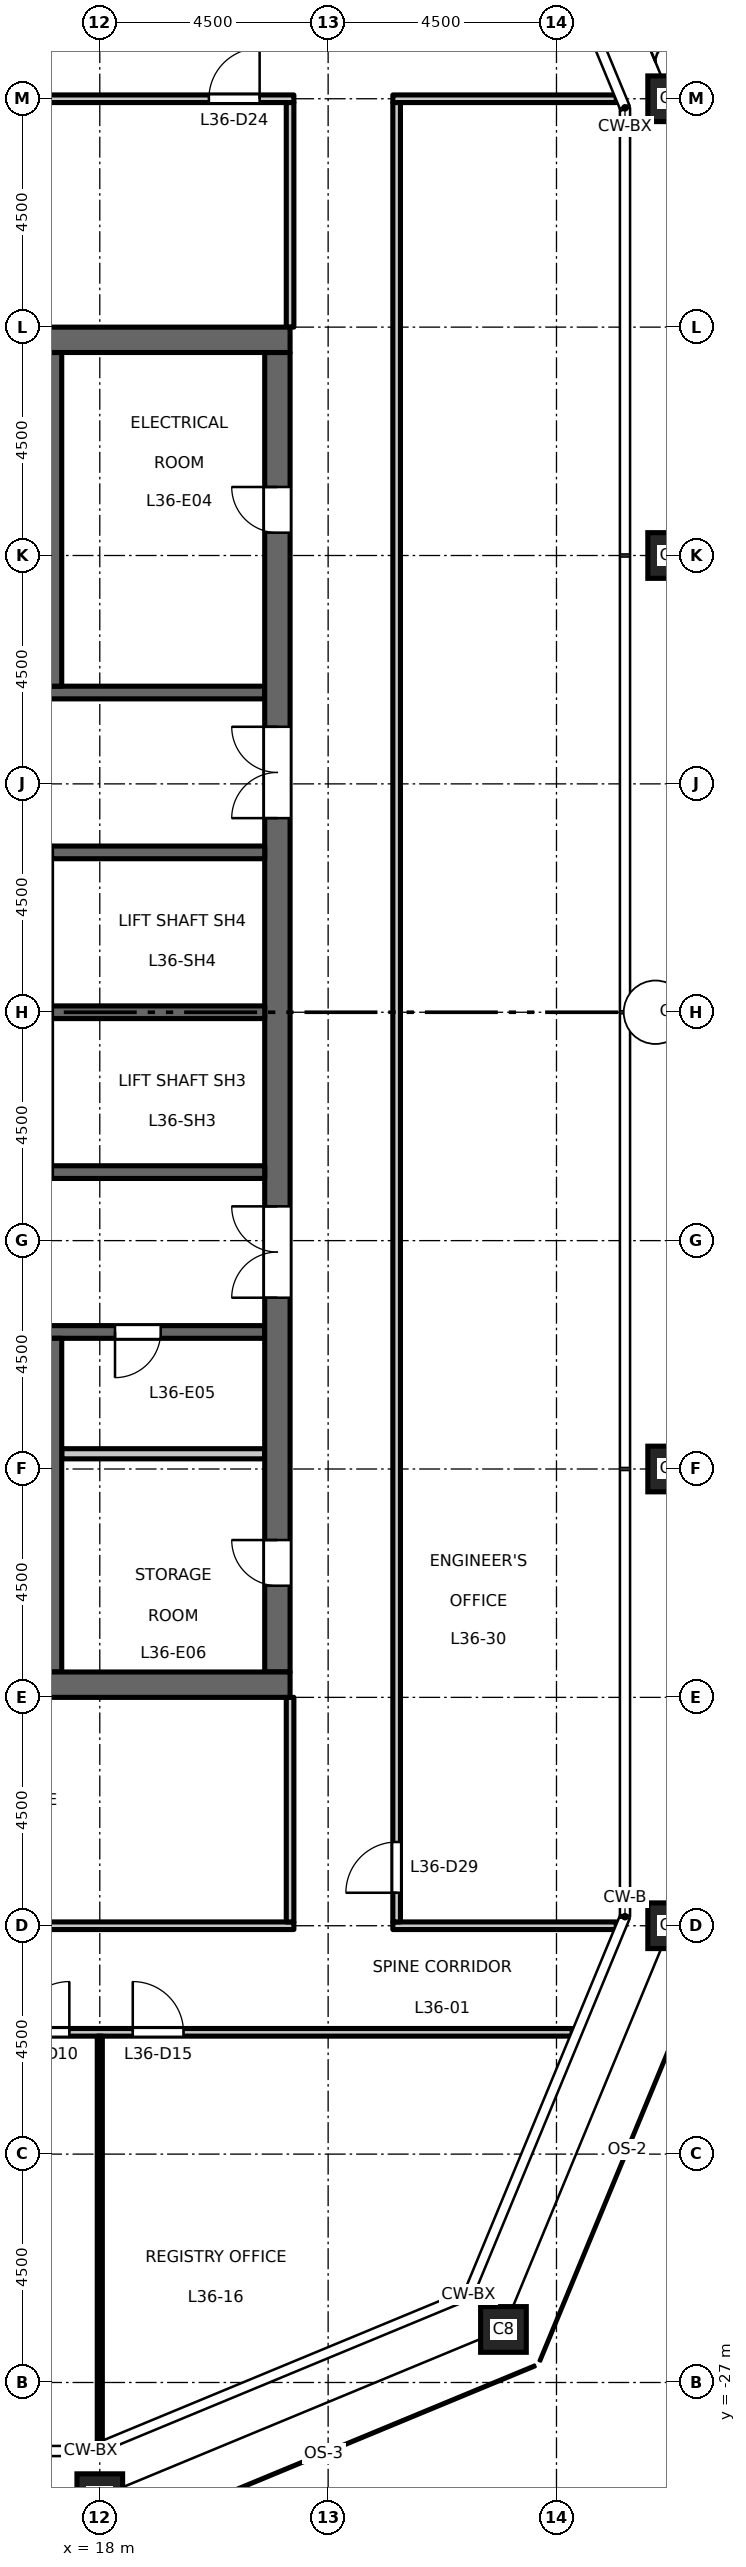
"""IFC4 building model, lengths in metres.
Left out: names, types, materials, properties, quantities, classifications, styles, units other than length and angle.
Written with IfcOpenShell. Run it as: python <this file> out.ifc"""

import sys

from ifc_helpers import new_model, si_unit, direction, frame, frame_2d, origin, origin_2d, place, context, subcontext, project, spatial, rectangle, hollow_rectangle, extrude, element, fill, save


model = new_model("IFC4")
c1 = context("Model", 3, precision=1e-05, world=origin(), true_north=direction((0.0, 1.0)))
c2 = subcontext(c1, "Body", "Model", "MODEL_VIEW")
j1 = project(units=[si_unit("LENGTHUNIT", "METRE"), si_unit("PLANEANGLEUNIT", "RADIAN")], contexts=[c1])
p1 = place(None, origin())
s1 = spatial("IfcSite", under=j1, at=p1, CompositionType="ELEMENT")
p2 = place(p1, origin())
s2 = spatial("IfcBuilding", under=s1, at=p2, CompositionType="ELEMENT")
p3 = place(p2, frame((0.0, 0.0, 167.7)))
s3 = spatial("IfcBuildingStorey", under=s2, at=p3, CompositionType="ELEMENT", Elevation=167.7)
for number, where, z_axis, x_axis in (
    (1, (18.0, -29.25, 0.0), (0.0, 0.0, 1.0), (1.0, 0.0, 0.0)),
    (2, (25.955, -25.955, 0.0), (0.0, 0.0, 1.0), (1.0, 0.0, 0.0)),
    (3, (29.25, -18.0, 0.0), (0.0, 0.0, 1.0), (1.0, 0.0, 0.0)),
    (4, (29.25, -9.0, 0.0), (0.0, 0.0, 1.0), (1.0, 0.0, 0.0)),
    (5, (29.25, 0.0, 0.0), (0.0, 0.0, 1.0), (1.0, 0.0, 0.0)),
    (6, (29.25, 9.0, 0.0), (0.0, 0.0, 1.0), (1.0, 0.0, 0.0)),
    (7, (29.25, 18.0, 0.0), (0.0, 0.0, 1.0), (1.0, 0.0, 0.0)),
):
    element("IfcColumn", number, at=place(p3, frame(where, z_axis=z_axis, x_axis=x_axis)), inside=s3, PredefinedType="COLUMN", context=c2, shape_type="SweptSolid", body=[
        extrude(hollow_rectangle(XDim=0.9, YDim=0.9, WallThickness=0.05, at=origin_2d()), origin(), (0.0, 0.0, 1.0), 4.5),
    ])
p4 = place(p3, frame((17.0, 6.3, 0.0), z_axis=(0.0, 0.0, 1.0), x_axis=(1.0, 0.0, 0.0)))
e8 = element("IfcWall", 8, at=p4, inside=s3, PredefinedType="SHEAR", context=c2, shape_type="SweptSolid", body=[
    extrude(rectangle(XDim=4.25, YDim=0.25, at=frame_2d((2.125, 0.0))), origin(), (0.0, 0.0, 1.0), 4.35),
])
p5 = place(p3, frame((12.15, -6.3, 0.0), z_axis=(0.0, 0.0, 1.0), x_axis=(1.0, 0.0, 0.0)))
e9 = element("IfcWall", 9, at=p5, inside=s3, PredefinedType="SHEAR", context=c2, shape_type="SweptSolid", body=[
    extrude(rectangle(XDim=9.1, YDim=0.25, at=frame_2d((4.55, 0.0))), origin(), (0.0, 0.0, 1.0), 4.35),
])
p6 = place(p5, frame((1.8, 0.0, 0.0)))
e10 = element("IfcOpeningElement", 10, at=p6, cuts=e9, PredefinedType="OPENING", context=c2, shape_type="SweptSolid", body=[
    extrude(rectangle(XDim=1.0, YDim=2.1, at=frame_2d((0.5, 1.05))), frame((0.0, 0.135, 0.0), z_axis=(0.0, -1.0, 0.0), x_axis=(1.0, 0.0, 0.0)), (0.0, 0.0, 1.0), 0.27),
])
p7 = place(p5, frame((6.15, 0.0, 0.0)))
e11 = element("IfcOpeningElement", 11, at=p7, cuts=e9, PredefinedType="OPENING", context=c2, shape_type="SweptSolid", body=[
    extrude(rectangle(XDim=0.9, YDim=2.1, at=frame_2d((0.45, 1.05))), frame((0.0, 0.135, 0.0), z_axis=(0.0, -1.0, 0.0), x_axis=(1.0, 0.0, 0.0)), (0.0, 0.0, 1.0), 0.27),
])
p8 = place(p3, frame((21.5, -13.0, 0.0), z_axis=(0.0, 0.0, 1.0), x_axis=(0.0, 1.0, 0.0)))
e12 = element("IfcWall", 12, at=p8, inside=s3, PredefinedType="SHEAR", context=c2, shape_type="SweptSolid", body=[
    extrude(rectangle(XDim=26.0, YDim=0.5, at=frame_2d((13.0, 0.0))), origin(), (0.0, 0.0, 1.0), 4.35),
])
p9 = place(p8, frame((16.825, 0.0, 0.0)))
e13 = element("IfcOpeningElement", 13, at=p9, cuts=e12, PredefinedType="OPENING", context=c2, shape_type="SweptSolid", body=[
    extrude(rectangle(XDim=1.8, YDim=2.1, at=frame_2d((0.9, 1.05))), frame((0.0, 0.26, 0.0), z_axis=(0.0, -1.0, 0.0), x_axis=(1.0, 0.0, 0.0)), (0.0, 0.0, 1.0), 0.52),
])
p10 = place(p8, frame((7.375, 0.0, 0.0)))
e14 = element("IfcOpeningElement", 14, at=p10, cuts=e12, PredefinedType="OPENING", context=c2, shape_type="SweptSolid", body=[
    extrude(rectangle(XDim=1.8, YDim=2.1, at=frame_2d((0.9, 1.05))), frame((0.0, 0.26, 0.0), z_axis=(0.0, -1.0, 0.0), x_axis=(1.0, 0.0, 0.0)), (0.0, 0.0, 1.0), 0.52),
])
p11 = place(p8, frame((22.45, 0.0, 0.0)))
e15 = element("IfcOpeningElement", 15, at=p11, cuts=e12, PredefinedType="OPENING", context=c2, shape_type="SweptSolid", body=[
    extrude(rectangle(XDim=0.9, YDim=2.1, at=frame_2d((0.45, 1.05))), frame((0.0, 0.26, 0.0), z_axis=(0.0, -1.0, 0.0), x_axis=(1.0, 0.0, 0.0)), (0.0, 0.0, 1.0), 0.52),
])
p12 = place(p8, frame((1.7, 0.0, 0.0)))
e16 = element("IfcOpeningElement", 16, at=p12, cuts=e12, PredefinedType="OPENING", context=c2, shape_type="SweptSolid", body=[
    extrude(rectangle(XDim=0.9, YDim=2.1, at=frame_2d((0.45, 1.05))), frame((0.0, 0.26, 0.0), z_axis=(0.0, -1.0, 0.0), x_axis=(1.0, 0.0, 0.0)), (0.0, 0.0, 1.0), 0.52),
])
p13 = place(p3, frame((17.25, -8.7, 0.0), z_axis=(0.0, 0.0, 1.0), x_axis=(1.0, 0.0, 0.0)))
e17 = element("IfcWall", 17, at=p13, inside=s3, PredefinedType="PARTITIONING", context=c2, shape_type="SweptSolid", body=[
    extrude(rectangle(XDim=4.0, YDim=0.2, at=frame_2d((2.0, 0.0))), origin(), (0.0, 0.0, 1.0), 4.35),
])
for number, where, z_axis, x_axis in (
    (18, (17.05, 0.0, 0.0), (0.0, 0.0, 1.0), (1.0, 0.0, 0.0)),
    (19, (17.05, 3.15, 0.0), (0.0, 0.0, 1.0), (1.0, 0.0, 0.0)),
    (20, (17.05, -3.15, 0.0), (0.0, 0.0, 1.0), (1.0, 0.0, 0.0)),
):
    element("IfcWall", number, at=place(p3, frame(where, z_axis=z_axis, x_axis=x_axis)), inside=s3, PredefinedType="SHEAR", context=c2, shape_type="SweptSolid", body=[
        extrude(rectangle(XDim=4.2, YDim=0.25, at=frame_2d((2.1, 0.0))), origin(), (0.0, 0.0, 1.0), 4.35),
    ])
for number, where, z_axis, x_axis in (
    (21, (17.0, 6.425, 0.0), (0.0, 0.0, 1.0), (0.0, 1.0, 0.0)),
    (22, (17.0, -13.0, 0.0), (0.0, 0.0, 1.0), (0.0, 1.0, 0.0)),
):
    element("IfcWall", number, at=place(p3, frame(where, z_axis=z_axis, x_axis=x_axis)), inside=s3, PredefinedType="SHEAR", context=c2, shape_type="SweptSolid", body=[
        extrude(rectangle(XDim=6.575, YDim=0.5, at=frame_2d((3.288, 0.0))), origin(), (0.0, 0.0, 1.0), 4.35),
    ])
for number, where, z_axis, x_axis in (
    (23, (8.25, 13.25, 0.0), (0.0, 0.0, 1.0), (1.0, 0.0, 0.0)),
    (24, (8.25, -13.25, 0.0), (0.0, 0.0, 1.0), (1.0, 0.0, 0.0)),
):
    element("IfcWall", number, at=place(p3, frame(where, z_axis=z_axis, x_axis=x_axis)), inside=s3, PredefinedType="SHEAR", context=c2, shape_type="SweptSolid", body=[
        extrude(rectangle(XDim=13.5, YDim=0.5, at=frame_2d((6.75, 0.0))), origin(), (0.0, 0.0, 1.0), 4.35),
    ])
p14 = place(p3, frame((-27.308, -20.1, 0.0), z_axis=(0.0, 0.0, 1.0), x_axis=(1.0, 0.0, 0.0)))
e25 = element("IfcWall", 25, at=p14, inside=s3, PredefinedType="PARTITIONING", context=c2, shape_type="SweptSolid", body=[
    extrude(rectangle(XDim=54.616, YDim=0.15, at=frame_2d((27.308, 0.0))), origin(), (0.0, 0.0, 1.0), 4.35),
])
p15 = place(p14, frame((16.708, 0.0, 0.0)))
e26 = element("IfcOpeningElement", 26, at=p15, cuts=e25, PredefinedType="OPENING", context=c2, shape_type="SweptSolid", body=[
    extrude(rectangle(XDim=1.0, YDim=2.1, at=frame_2d((0.5, 1.05))), frame((0.0, 0.085, 0.0), z_axis=(0.0, -1.0, 0.0), x_axis=(1.0, 0.0, 0.0)), (0.0, 0.0, 1.0), 0.17),
])
p16 = place(p14, frame((18.958, 0.0, 0.0)))
e27 = element("IfcOpeningElement", 27, at=p16, cuts=e25, PredefinedType="OPENING", context=c2, shape_type="SweptSolid", body=[
    extrude(rectangle(XDim=1.0, YDim=2.1, at=frame_2d((0.5, 1.05))), frame((0.0, 0.085, 0.0), z_axis=(0.0, -1.0, 0.0), x_axis=(1.0, 0.0, 0.0)), (0.0, 0.0, 1.0), 0.17),
])
p17 = place(p14, frame((34.708, 0.0, 0.0)))
e28 = element("IfcOpeningElement", 28, at=p17, cuts=e25, PredefinedType="OPENING", context=c2, shape_type="SweptSolid", body=[
    extrude(rectangle(XDim=1.0, YDim=2.1, at=frame_2d((0.5, 1.05))), frame((0.0, 0.085, 0.0), z_axis=(0.0, -1.0, 0.0), x_axis=(1.0, 0.0, 0.0)), (0.0, 0.0, 1.0), 0.17),
])
p18 = place(p14, frame((43.708, 0.0, 0.0)))
e29 = element("IfcOpeningElement", 29, at=p18, cuts=e25, PredefinedType="OPENING", context=c2, shape_type="SweptSolid", body=[
    extrude(rectangle(XDim=1.0, YDim=2.1, at=frame_2d((0.5, 1.05))), frame((0.0, 0.085, 0.0), z_axis=(0.0, -1.0, 0.0), x_axis=(1.0, 0.0, 0.0)), (0.0, 0.0, 1.0), 0.17),
])
p19 = place(p14, frame((7.65, 0.0, 0.0)))
e30 = element("IfcOpeningElement", 30, at=p19, cuts=e25, PredefinedType="OPENING", context=c2, shape_type="SweptSolid", body=[
    extrude(rectangle(XDim=1.0, YDim=2.1, at=frame_2d((0.5, 1.05))), frame((0.0, 0.085, 0.0), z_axis=(0.0, -1.0, 0.0), x_axis=(1.0, 0.0, 0.0)), (0.0, 0.0, 1.0), 0.17),
])
p20 = place(p14, frame((45.958, 0.0, 0.0)))
e31 = element("IfcOpeningElement", 31, at=p20, cuts=e25, PredefinedType="OPENING", context=c2, shape_type="SweptSolid", body=[
    extrude(rectangle(XDim=1.0, YDim=2.1, at=frame_2d((0.5, 1.05))), frame((0.0, 0.085, 0.0), z_axis=(0.0, -1.0, 0.0), x_axis=(1.0, 0.0, 0.0)), (0.0, 0.0, 1.0), 0.17),
])
p21 = place(p3, frame((-21.825, -18.0, 0.0), z_axis=(0.0, 0.0, 1.0), x_axis=(1.0, 0.0, 0.0)))
e32 = element("IfcWall", 32, at=p21, inside=s3, PredefinedType="PARTITIONING", context=c2, shape_type="SweptSolid", body=[
    extrude(rectangle(XDim=43.65, YDim=0.15, at=frame_2d((21.825, 0.0))), origin(), (0.0, 0.0, 1.0), 4.35),
])
p22 = place(p21, frame((14.175, 0.0, 0.0)))
e33 = element("IfcOpeningElement", 33, at=p22, cuts=e32, PredefinedType="OPENING", context=c2, shape_type="SweptSolid", body=[
    extrude(rectangle(XDim=1.0, YDim=2.1, at=frame_2d((0.5, 1.05))), frame((0.0, 0.085, 0.0), z_axis=(0.0, -1.0, 0.0), x_axis=(1.0, 0.0, 0.0)), (0.0, 0.0, 1.0), 0.17),
])
p23 = place(p21, frame((11.925, 0.0, 0.0)))
e34 = element("IfcOpeningElement", 34, at=p23, cuts=e32, PredefinedType="OPENING", context=c2, shape_type="SweptSolid", body=[
    extrude(rectangle(XDim=1.0, YDim=2.1, at=frame_2d((0.5, 1.05))), frame((0.0, 0.085, 0.0), z_axis=(0.0, -1.0, 0.0), x_axis=(1.0, 0.0, 0.0)), (0.0, 0.0, 1.0), 0.17),
])
p24 = place(p21, frame((30.675, 0.0, 0.0)))
e35 = element("IfcOpeningElement", 35, at=p24, cuts=e32, PredefinedType="OPENING", context=c2, shape_type="SweptSolid", body=[
    extrude(rectangle(XDim=1.0, YDim=2.1, at=frame_2d((0.5, 1.05))), frame((0.0, 0.085, 0.0), z_axis=(0.0, -1.0, 0.0), x_axis=(1.0, 0.0, 0.0)), (0.0, 0.0, 1.0), 0.17),
])
p25 = place(p3, frame((23.775, -18.0, 0.0), z_axis=(0.0, 0.0, 1.0), x_axis=(1.0, 0.0, 0.0)))
e36 = element("IfcWall", 36, at=p25, inside=s3, PredefinedType="PARTITIONING", context=c2, shape_type="SweptSolid", body=[
    extrude(rectangle(XDim=4.403, YDim=0.15, at=frame_2d((2.202, 0.0))), origin(), (0.0, 0.0, 1.0), 4.35),
])
p26 = place(p3, frame((0.0, 18.0, 0.0), z_axis=(0.0, 0.0, 1.0), x_axis=(1.0, 0.0, 0.0)))
e37 = element("IfcWall", 37, at=p26, inside=s3, PredefinedType="PARTITIONING", context=c2, shape_type="SweptSolid", body=[
    extrude(rectangle(XDim=21.825, YDim=0.15, at=frame_2d((10.913, 0.0))), origin(), (0.0, 0.0, 1.0), 4.35),
])
p27 = place(p26, frame((0.65, 0.0, 0.0)))
e38 = element("IfcOpeningElement", 38, at=p27, cuts=e37, PredefinedType="OPENING", context=c2, shape_type="SweptSolid", body=[
    extrude(rectangle(XDim=1.0, YDim=2.1, at=frame_2d((0.5, 1.05))), frame((0.0, 0.085, 0.0), z_axis=(0.0, -1.0, 0.0), x_axis=(1.0, 0.0, 0.0)), (0.0, 0.0, 1.0), 0.17),
])
p28 = place(p26, frame((20.15, 0.0, 0.0)))
e39 = element("IfcOpeningElement", 39, at=p28, cuts=e37, PredefinedType="OPENING", context=c2, shape_type="SweptSolid", body=[
    extrude(rectangle(XDim=1.0, YDim=2.1, at=frame_2d((0.5, 1.05))), frame((0.0, 0.085, 0.0), z_axis=(0.0, -1.0, 0.0), x_axis=(1.0, 0.0, 0.0)), (0.0, 0.0, 1.0), 0.17),
])
p29 = place(p3, frame((23.775, 18.0, 0.0), z_axis=(0.0, 0.0, 1.0), x_axis=(1.0, 0.0, 0.0)))
e40 = element("IfcWall", 40, at=p29, inside=s3, PredefinedType="PARTITIONING", context=c2, shape_type="SweptSolid", body=[
    extrude(rectangle(XDim=4.403, YDim=0.15, at=frame_2d((2.202, 0.0))), origin(), (0.0, 0.0, 1.0), 4.35),
])
p30 = place(p3, frame((18.0, -28.178, 0.0), z_axis=(0.0, 0.0, 1.0), x_axis=(0.0, 1.0, 0.0)))
e41 = element("IfcWall", 41, at=p30, inside=s3, PredefinedType="PARTITIONING", context=c2, shape_type="SweptSolid", body=[
    extrude(rectangle(XDim=8.003, YDim=0.1, at=frame_2d((4.001, 0.0))), origin(), (0.0, 0.0, 1.0), 3.45),
])
for number, where, z_axis, x_axis in (
    (42, (21.75, -17.925, 0.0), (0.0, 0.0, 1.0), (0.0, 1.0, 0.0)),
    (43, (21.75, 13.5, 0.0), (0.0, 0.0, 1.0), (0.0, 1.0, 0.0)),
):
    element("IfcWall", number, at=place(p3, frame(where, z_axis=z_axis, x_axis=x_axis)), inside=s3, PredefinedType="PARTITIONING", context=c2, shape_type="SweptSolid", body=[
        extrude(rectangle(XDim=4.425, YDim=0.15, at=frame_2d((2.212, 0.0))), origin(), (0.0, 0.0, 1.0), 4.35),
    ])
p31 = place(p3, frame((23.85, -17.925, 0.0), z_axis=(0.0, 0.0, 1.0), x_axis=(0.0, 1.0, 0.0)))
e44 = element("IfcWall", 44, at=p31, inside=s3, PredefinedType="PARTITIONING", context=c2, shape_type="SweptSolid", body=[
    extrude(rectangle(XDim=35.85, YDim=0.15, at=frame_2d((17.925, 0.0))), origin(), (0.0, 0.0, 1.0), 4.35),
])
p32 = place(p31, frame((0.575, 0.0, 0.0)))
e45 = element("IfcOpeningElement", 45, at=p32, cuts=e44, PredefinedType="OPENING", context=c2, shape_type="SweptSolid", body=[
    extrude(rectangle(XDim=1.0, YDim=2.1, at=frame_2d((0.5, 1.05))), frame((0.0, 0.085, 0.0), z_axis=(0.0, -1.0, 0.0), x_axis=(1.0, 0.0, 0.0)), (0.0, 0.0, 1.0), 0.17),
])
p33 = place(p9, origin())
e46 = element("IfcDoor", 46, at=p33, inside=s3, OperationType="DOUBLE_DOOR_DOUBLE_SWING", PredefinedType="DOOR", context=c2, shape_type="SweptSolid", body=[
    extrude(rectangle(XDim=1.8, YDim=2.1, at=frame_2d((0.9, 1.05))), frame((0.0, 0.025, 0.0), z_axis=(0.0, -1.0, 0.0), x_axis=(1.0, 0.0, 0.0)), (0.0, 0.0, 1.0), 0.05),
])
fill(e13, e46)
p34 = place(p10, origin())
e47 = element("IfcDoor", 47, at=p34, inside=s3, OperationType="DOUBLE_DOOR_DOUBLE_SWING", PredefinedType="DOOR", context=c2, shape_type="SweptSolid", body=[
    extrude(rectangle(XDim=1.8, YDim=2.1, at=frame_2d((0.9, 1.05))), frame((0.0, 0.025, 0.0), z_axis=(0.0, -1.0, 0.0), x_axis=(1.0, 0.0, 0.0)), (0.0, 0.0, 1.0), 0.05),
])
fill(e14, e47)
p35 = place(p11, origin())
e48 = element("IfcDoor", 48, at=p35, inside=s3, OperationType="SINGLE_SWING_LEFT", PredefinedType="DOOR", context=c2, shape_type="SweptSolid", body=[
    extrude(rectangle(XDim=0.9, YDim=2.1, at=frame_2d((0.45, 1.05))), frame((0.0, 0.025, 0.0), z_axis=(0.0, -1.0, 0.0), x_axis=(1.0, 0.0, 0.0)), (0.0, 0.0, 1.0), 0.05),
])
fill(e15, e48)
p36 = place(p7, origin())
e49 = element("IfcDoor", 49, at=p36, inside=s3, OperationType="SINGLE_SWING_LEFT", PredefinedType="DOOR", context=c2, shape_type="SweptSolid", body=[
    extrude(rectangle(XDim=0.9, YDim=2.1, at=frame_2d((0.45, 1.05))), frame((0.0, 0.025, 0.0), z_axis=(0.0, -1.0, 0.0), x_axis=(1.0, 0.0, 0.0)), (0.0, 0.0, 1.0), 0.05),
])
fill(e11, e49)
p37 = place(p12, origin())
e50 = element("IfcDoor", 50, at=p37, inside=s3, OperationType="SINGLE_SWING_LEFT", PredefinedType="DOOR", context=c2, shape_type="SweptSolid", body=[
    extrude(rectangle(XDim=0.9, YDim=2.1, at=frame_2d((0.45, 1.05))), frame((0.0, 0.025, 0.0), z_axis=(0.0, -1.0, 0.0), x_axis=(1.0, 0.0, 0.0)), (0.0, 0.0, 1.0), 0.05),
])
fill(e16, e50)
p38 = place(p18, origin())
e51 = element("IfcDoor", 51, at=p38, inside=s3, OperationType="SINGLE_SWING_RIGHT", PredefinedType="DOOR", context=c2, shape_type="SweptSolid", body=[
    extrude(rectangle(XDim=1.0, YDim=2.1, at=frame_2d((0.5, 1.05))), frame((0.0, 0.025, 0.0), z_axis=(0.0, -1.0, 0.0), x_axis=(1.0, 0.0, 0.0)), (0.0, 0.0, 1.0), 0.05),
])
fill(e29, e51)
p39 = place(p20, origin())
e52 = element("IfcDoor", 52, at=p39, inside=s3, OperationType="SINGLE_SWING_LEFT", PredefinedType="DOOR", context=c2, shape_type="SweptSolid", body=[
    extrude(rectangle(XDim=1.0, YDim=2.1, at=frame_2d((0.5, 1.05))), frame((0.0, 0.025, 0.0), z_axis=(0.0, -1.0, 0.0), x_axis=(1.0, 0.0, 0.0)), (0.0, 0.0, 1.0), 0.05),
])
fill(e31, e52)
p40 = place(p28, origin())
e53 = element("IfcDoor", 53, at=p40, inside=s3, OperationType="SINGLE_SWING_RIGHT", PredefinedType="DOOR", context=c2, shape_type="SweptSolid", body=[
    extrude(rectangle(XDim=1.0, YDim=2.1, at=frame_2d((0.5, 1.05))), frame((0.0, 0.025, 0.0), z_axis=(0.0, -1.0, 0.0), x_axis=(1.0, 0.0, 0.0)), (0.0, 0.0, 1.0), 0.05),
])
fill(e39, e53)
p41 = place(p32, origin())
e54 = element("IfcDoor", 54, at=p41, inside=s3, OperationType="SINGLE_SWING_LEFT", PredefinedType="DOOR", context=c2, shape_type="SweptSolid", body=[
    extrude(rectangle(XDim=1.0, YDim=2.1, at=frame_2d((0.5, 1.05))), frame((0.0, 0.025, 0.0), z_axis=(0.0, -1.0, 0.0), x_axis=(1.0, 0.0, 0.0)), (0.0, 0.0, 1.0), 0.05),
])
fill(e45, e54)
save(model, sys.argv[1])
